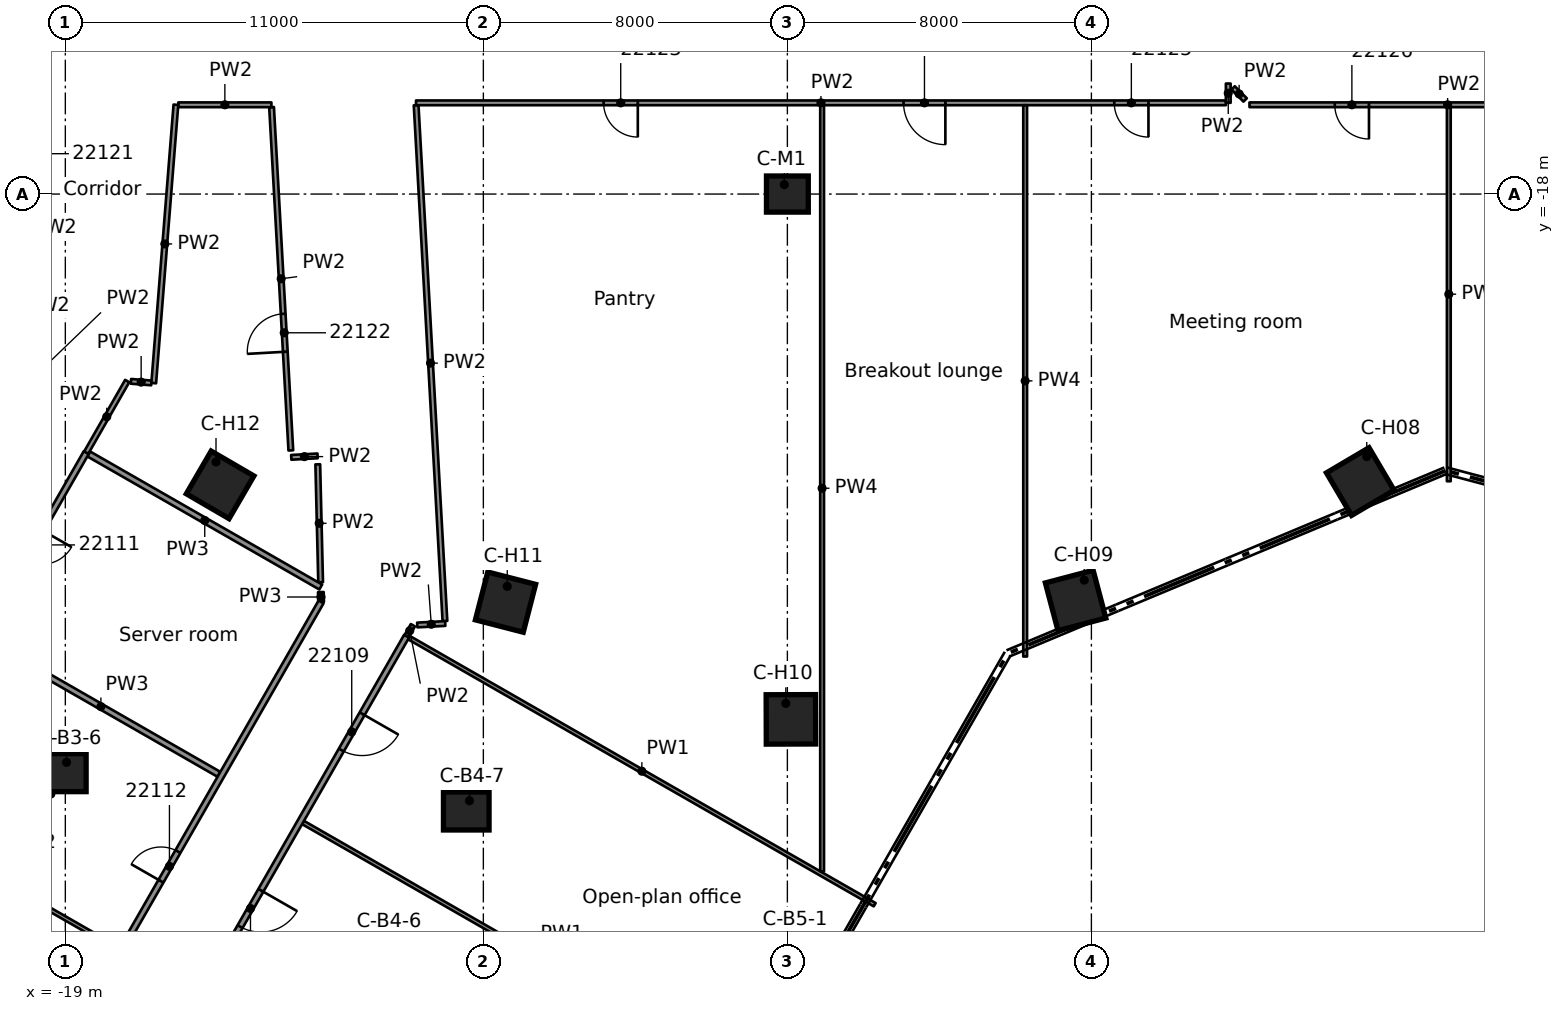
"""IFC4 building model, lengths in metres.
Left out: names, types, materials, properties, quantities, classifications, styles, units other than length and angle.
Written with IfcOpenShell. Run it as: python <this file> out.ifc"""

import sys

from ifc_helpers import new_model, si_unit, direction, frame, frame_2d, origin, origin_2d, place, context, subcontext, project, spatial, rectangle, extrude, element, fill, save


model = new_model("IFC4")
c1 = context("Model", 3, precision=1e-05, world=origin(), true_north=direction((0.0, 1.0)))
c2 = subcontext(c1, "Body", "Model", "MODEL_VIEW")
j1 = project(units=[si_unit("LENGTHUNIT", "METRE"), si_unit("PLANEANGLEUNIT", "RADIAN")], contexts=[c1])
p1 = place(None, origin())
s1 = spatial("IfcSite", under=j1, at=p1, CompositionType="ELEMENT")
p2 = place(p1, origin())
s2 = spatial("IfcBuilding", under=s1, at=p2, CompositionType="ELEMENT")
p3 = place(p2, frame((0.0, 0.0, 116.2)))
s3 = spatial("IfcBuildingStorey", under=s2, at=p3, CompositionType="ELEMENT", Elevation=116.2)
for number, where, z_axis, x_axis in (
    (1, (-19.053, -33.224, 0.0), (0.0, 0.0, 1.0), (1.0, 0.0, 0.0)),
    (2, (-8.45, -34.233, 0.0), (0.0, 0.0, 1.0), (1.0, 0.0, 0.0)),
):
    element("IfcColumn", number, at=place(p3, frame(where, z_axis=z_axis, x_axis=x_axis)), inside=s3, PredefinedType="COLUMN", context=c2, shape_type="SweptSolid", body=[
        extrude(rectangle(XDim=1.2, YDim=1.0, at=origin_2d()), origin(), (0.0, 0.0, 1.0), 3.5),
    ])
for number, where, z_axis, x_axis in (
    (3, (15.076, -25.565, 0.0), (0.0, 0.0, 1.0), (0.508, -0.861, 0.0)),
    (4, (7.584, -28.694, 0.0), (0.0, 0.0, 1.0), (0.256, -0.967, 0.0)),
    (5, (0.093, -31.822, 0.0), (0.0, 0.0, 1.0), (0.003, -1.0, 0.0)),
    (6, (-7.417, -28.737, 0.0), (0.0, 0.0, 1.0), (-0.25, -0.968, 0.0)),
    (7, (-14.927, -25.652, 0.0), (0.0, 0.0, 1.0), (-0.503, -0.864, 0.0)),
):
    element("IfcColumn", number, at=place(p3, frame(where, z_axis=z_axis, x_axis=x_axis)), inside=s3, PredefinedType="COLUMN", context=c2, shape_type="SweptSolid", body=[
        extrude(rectangle(XDim=1.3, YDim=1.3, at=origin_2d()), origin(), (0.0, 0.0, 1.0), 3.5),
    ])
p4 = place(p3, frame((0.0, -18.0, 0.0), z_axis=(0.0, 0.0, 1.0), x_axis=(1.0, 0.0, 0.0)))
e8 = element("IfcColumn", 8, at=p4, inside=s3, PredefinedType="COLUMN", context=c2, shape_type="SweptSolid", body=[
    extrude(rectangle(XDim=1.1, YDim=0.95, at=origin_2d()), origin(), (0.0, 0.0, 1.0), 3.5),
])
p5 = place(p3, frame((-12.276, -28.473, 0.0), z_axis=(0.0, 0.0, 1.0), x_axis=(0.022614384817, -0.999744262099, 0.0)))
e9 = element("IfcWall", 9, at=p5, inside=s3, PredefinedType="PARTITIONING", context=c2, shape_type="SweptSolid", body=[
    extrude(rectangle(XDim=0.259, YDim=0.15, at=frame_2d((0.129, 0.0))), origin(), (0.0, 0.0, 1.0), 3.08),
])
p6 = place(p3, frame((-12.357, -25.112, 0.0), z_axis=(0.0, 0.0, 1.0), x_axis=(0.024154763652, -0.999708231132, 0.0)))
e10 = element("IfcWall", 10, at=p6, inside=s3, PredefinedType="PARTITIONING", context=c2, shape_type="SweptSolid", body=[
    extrude(rectangle(XDim=3.103, YDim=0.125, at=frame_2d((1.552, 0.0))), origin(), (0.0, 0.0, 1.0), 3.08),
])
p7 = place(p3, frame((-13.066, -24.745, 0.0), z_axis=(0.0, 0.0, 1.0), x_axis=(-0.056052939146, 0.998427798097, 0.0)))
e11 = element("IfcWall", 11, at=p7, inside=s3, PredefinedType="PARTITIONING", context=c2, shape_type="SweptSolid", body=[
    extrude(rectangle(XDim=9.046, YDim=0.125, at=frame_2d((4.523, 0.0))), origin(), (0.0, 0.0, 1.0), 3.08),
])
p8 = place(p7, frame((2.6, 0.0, 0.0)))
e12 = element("IfcOpeningElement", 12, at=p8, cuts=e11, PredefinedType="OPENING", context=c2, shape_type="SweptSolid", body=[
    extrude(rectangle(XDim=1.0, YDim=2.1, at=frame_2d((0.5, 1.05))), frame((0.0, 0.073, 0.0), z_axis=(0.0, -1.0, 0.0), x_axis=(1.0, 0.0, 0.0)), (0.0, 0.0, 1.0), 0.145),
])
p9 = place(p3, frame((-9.769, -15.662, 0.0), z_axis=(0.0, 0.0, 1.0), x_axis=(0.055763443597, -0.998444008625, 0.0)))
e13 = element("IfcWall", 13, at=p9, inside=s3, PredefinedType="PARTITIONING", context=c2, shape_type="SweptSolid", body=[
    extrude(rectangle(XDim=13.594, YDim=0.125, at=frame_2d((6.797, 0.0))), origin(), (0.0, 0.0, 1.0), 3.08),
])
p10 = place(p3, frame((11.729, -15.207, 0.0), z_axis=(0.0, 0.0, 1.0), x_axis=(0.707106781187, -0.707106781187, 0.0)))
e14 = element("IfcWall", 14, at=p10, inside=s3, PredefinedType="PARTITIONING", context=c2, shape_type="SweptSolid", body=[
    extrude(rectangle(XDim=0.448, YDim=0.125, at=frame_2d((0.224, 0.0))), origin(), (0.0, 0.0, 1.0), 3.08),
])
p11 = place(p3, frame((-23.804, -34.304, 0.0), z_axis=(0.0, 0.0, 1.0), x_axis=(0.867490790569, -0.497453242304, 0.0)))
e15 = element("IfcWall", 15, at=p11, inside=s3, PredefinedType="PARTITIONING", context=c2, shape_type="SweptSolid", body=[
    extrude(rectangle(XDim=7.158, YDim=0.1, at=frame_2d((3.579, 0.0))), origin(), (0.0, 0.0, 1.0), 3.08),
])
p12 = place(p3, frame((-21.17, -29.705, 0.0), z_axis=(0.0, 0.0, 1.0), x_axis=(0.86744058168, -0.497540789539, 0.0)))
e16 = element("IfcWall", 16, at=p12, inside=s3, PredefinedType="PARTITIONING", context=c2, shape_type="SweptSolid", body=[
    extrude(rectangle(XDim=7.161, YDim=0.15, at=frame_2d((3.581, 0.0))), origin(), (0.0, 0.0, 1.0), 3.08),
])
p13 = place(p3, frame((-12.745, -34.536, 0.0), z_axis=(0.0, 0.0, 1.0), x_axis=(0.867470957273, -0.497487827277, 0.0)))
e17 = element("IfcWall", 17, at=p13, inside=s3, PredefinedType="PARTITIONING", context=c2, shape_type="SweptSolid", body=[
    extrude(rectangle(XDim=14.125, YDim=0.1, at=frame_2d((7.062, 0.0))), origin(), (0.0, 0.0, 1.0), 3.08),
])
p14 = place(p3, frame((-18.384, -24.839, 0.0), z_axis=(0.0, 0.0, 1.0), x_axis=(0.867482124602, -0.497468354266, 0.0)))
e18 = element("IfcWall", 18, at=p14, inside=s3, PredefinedType="PARTITIONING", context=c2, shape_type="SweptSolid", body=[
    extrude(rectangle(XDim=7.038, YDim=0.15, at=frame_2d((3.519, 0.0))), origin(), (0.0, 0.0, 1.0), 3.08),
])
p15 = place(p3, frame((-9.956, -29.673, 0.0), z_axis=(0.0, 0.0, 1.0), x_axis=(0.867525357275, -0.497392957816, 0.0)))
e19 = element("IfcWall", 19, at=p15, inside=s3, PredefinedType="PARTITIONING", context=c2, shape_type="SweptSolid", body=[
    extrude(rectangle(XDim=14.125, YDim=0.1, at=frame_2d((7.063, 0.0))), origin(), (0.0, 0.0, 1.0), 3.08),
])
p16 = place(p3, frame((-17.274, -22.928, 0.0), z_axis=(0.0, 0.0, 1.0), x_axis=(0.996965983674, -0.077838469901, 0.0)))
e20 = element("IfcWall", 20, at=p16, inside=s3, PredefinedType="PARTITIONING", context=c2, shape_type="SweptSolid", body=[
    extrude(rectangle(XDim=0.54, YDim=0.125, at=frame_2d((0.27, 0.0))), origin(), (0.0, 0.0, 1.0), 3.08),
])
p17 = place(p3, frame((-16.027, -15.651, 0.0), z_axis=(0.0, 0.0, 1.0), x_axis=(1.0, 0.0, 0.0)))
e21 = element("IfcWall", 21, at=p17, inside=s3, PredefinedType="PARTITIONING", context=c2, shape_type="SweptSolid", body=[
    extrude(rectangle(XDim=2.45, YDim=0.125, at=frame_2d((1.225, 0.0))), origin(), (0.0, 0.0, 1.0), 3.08),
])
p18 = place(p3, frame((22.587, -15.651, 0.0), z_axis=(0.0, 0.0, 1.0), x_axis=(-1.0, 0.0, 0.0)))
e22 = element("IfcWall", 22, at=p18, inside=s3, PredefinedType="PARTITIONING", context=c2, shape_type="SweptSolid", body=[
    extrude(rectangle(XDim=10.427, YDim=0.125, at=frame_2d((5.213, 0.0))), origin(), (0.0, 0.0, 1.0), 3.08),
])
p19 = place(p18, frame((7.282, 0.0, 0.0)))
e23 = element("IfcOpeningElement", 23, at=p19, cuts=e22, PredefinedType="OPENING", context=c2, shape_type="SweptSolid", body=[
    extrude(rectangle(XDim=0.9, YDim=2.1, at=frame_2d((0.45, 1.05))), frame((0.0, 0.073, 0.0), z_axis=(0.0, -1.0, 0.0), x_axis=(1.0, 0.0, 0.0)), (0.0, 0.0, 1.0), 0.145),
])
p20 = place(p3, frame((11.539, -15.6, 0.0), z_axis=(0.0, 0.0, 1.0), x_axis=(-1.0, 0.0, 0.0)))
e24 = element("IfcWall", 24, at=p20, inside=s3, PredefinedType="PARTITIONING", context=c2, shape_type="SweptSolid", body=[
    extrude(rectangle(XDim=21.311, YDim=0.125, at=frame_2d((10.656, 0.0))), origin(), (0.0, 0.0, 1.0), 3.08),
])
p21 = place(p20, frame((15.475, 0.0, 0.0)))
e25 = element("IfcOpeningElement", 25, at=p21, cuts=e24, PredefinedType="OPENING", context=c2, shape_type="SweptSolid", body=[
    extrude(rectangle(XDim=0.9, YDim=2.1, at=frame_2d((0.45, 1.05))), frame((0.0, 0.073, 0.0), z_axis=(0.0, -1.0, 0.0), x_axis=(1.0, 0.0, 0.0)), (0.0, 0.0, 1.0), 0.145),
])
p22 = place(p20, frame((7.382, 0.0, 0.0)))
e26 = element("IfcOpeningElement", 26, at=p22, cuts=e24, PredefinedType="OPENING", context=c2, shape_type="SweptSolid", body=[
    extrude(rectangle(XDim=1.1, YDim=2.1, at=frame_2d((0.55, 1.05))), frame((0.0, 0.073, 0.0), z_axis=(0.0, -1.0, 0.0), x_axis=(1.0, 0.0, 0.0)), (0.0, 0.0, 1.0), 0.145),
])
p23 = place(p20, frame((2.038, 0.0, 0.0)))
e27 = element("IfcOpeningElement", 27, at=p23, cuts=e24, PredefinedType="OPENING", context=c2, shape_type="SweptSolid", body=[
    extrude(rectangle(XDim=0.9, YDim=2.1, at=frame_2d((0.45, 1.05))), frame((0.0, 0.073, 0.0), z_axis=(0.0, -1.0, 0.0), x_axis=(1.0, 0.0, 0.0)), (0.0, 0.0, 1.0), 0.145),
])
p24 = place(p3, frame((-9.739, -29.339, 0.0), z_axis=(0.0, 0.0, 1.0), x_axis=(0.998594861221, 0.052993425471, 0.0)))
e28 = element("IfcWall", 28, at=p24, inside=s3, PredefinedType="PARTITIONING", context=c2, shape_type="SweptSolid", body=[
    extrude(rectangle(XDim=0.737, YDim=0.125, at=frame_2d((0.369, 0.0))), origin(), (0.0, 0.0, 1.0), 3.08),
])
p25 = place(p3, frame((-13.055, -24.928, 0.0), z_axis=(0.0, 0.0, 1.0), x_axis=(0.998414554179, 0.056288346959, 0.0)))
e29 = element("IfcWall", 29, at=p25, inside=s3, PredefinedType="PARTITIONING", context=c2, shape_type="SweptSolid", body=[
    extrude(rectangle(XDim=0.694, YDim=0.125, at=frame_2d((0.347, 0.0))), origin(), (0.0, 0.0, 1.0), 3.08),
])
p26 = place(p3, frame((-10.021, -29.636, 0.0), z_axis=(0.0, 0.0, 1.0), x_axis=(0.497705353429, 0.867346171473, 0.0)))
e30 = element("IfcWall", 30, at=p26, inside=s3, PredefinedType="PARTITIONING", context=c2, shape_type="SweptSolid", body=[
    extrude(rectangle(XDim=0.335, YDim=0.125, at=frame_2d((0.168, 0.0))), origin(), (0.0, 0.0, 1.0), 3.08),
])
p27 = place(p3, frame((-10.021, -29.636, 0.0), z_axis=(0.0, 0.0, 1.0), x_axis=(-0.49746005822, -0.867486882019, 0.0)))
e31 = element("IfcWall", 31, at=p27, inside=s3, PredefinedType="PARTITIONING", context=c2, shape_type="SweptSolid", body=[
    extrude(rectangle(XDim=24.806, YDim=0.15, at=frame_2d((12.403, 0.0))), origin(), (0.0, 0.0, 1.0), 3.08),
])
p28 = place(p27, frame((2.35, 0.0, 0.0)))
e32 = element("IfcOpeningElement", 32, at=p28, cuts=e31, PredefinedType="OPENING", context=c2, shape_type="SweptSolid", body=[
    extrude(rectangle(XDim=1.1, YDim=2.1, at=frame_2d((0.55, 1.05))), frame((0.0, 0.085, 0.0), z_axis=(0.0, -1.0, 0.0), x_axis=(1.0, 0.0, 0.0)), (0.0, 0.0, 1.0), 0.17),
])
p29 = place(p27, frame((7.706, 0.0, 0.0)))
e33 = element("IfcOpeningElement", 33, at=p29, cuts=e31, PredefinedType="OPENING", context=c2, shape_type="SweptSolid", body=[
    extrude(rectangle(XDim=1.1, YDim=2.1, at=frame_2d((0.55, 1.05))), frame((0.0, 0.085, 0.0), z_axis=(0.0, -1.0, 0.0), x_axis=(1.0, 0.0, 0.0)), (0.0, 0.0, 1.0), 0.17),
])
p30 = place(p27, frame((14.007, 0.0, 0.0)))
e34 = element("IfcOpeningElement", 34, at=p30, cuts=e31, PredefinedType="OPENING", context=c2, shape_type="SweptSolid", body=[
    extrude(rectangle(XDim=0.9, YDim=2.1, at=frame_2d((0.45, 1.05))), frame((0.0, 0.085, 0.0), z_axis=(0.0, -1.0, 0.0), x_axis=(1.0, 0.0, 0.0)), (0.0, 0.0, 1.0), 0.17),
])
p31 = place(p3, frame((-23.101, -47.618, 0.0), z_axis=(0.0, 0.0, 1.0), x_axis=(0.497490898243, 0.86746919609, 0.0)))
e35 = element("IfcWall", 35, at=p31, inside=s3, PredefinedType="PARTITIONING", context=c2, shape_type="SweptSolid", body=[
    extrude(rectangle(XDim=21.771, YDim=0.15, at=frame_2d((10.886, 0.0))), origin(), (0.0, 0.0, 1.0), 3.08),
])
p32 = place(p31, frame((13.3, 0.0, 0.0)))
e36 = element("IfcOpeningElement", 36, at=p32, cuts=e35, PredefinedType="OPENING", context=c2, shape_type="SweptSolid", body=[
    extrude(rectangle(XDim=0.9, YDim=2.1, at=frame_2d((0.45, 1.05))), frame((0.0, 0.085, 0.0), z_axis=(0.0, -1.0, 0.0), x_axis=(1.0, 0.0, 0.0)), (0.0, 0.0, 1.0), 0.17),
])
p33 = place(p3, frame((-18.449, -24.802, 0.0), z_axis=(0.0, 0.0, 1.0), x_axis=(-0.496915373234, -0.867799004288, 0.0)))
e37 = element("IfcWall", 37, at=p33, inside=s3, PredefinedType="PARTITIONING", context=c2, shape_type="SweptSolid", body=[
    extrude(rectangle(XDim=22.107, YDim=0.15, at=frame_2d((11.053, 0.0))), origin(), (0.0, 0.0, 1.0), 3.08),
])
p34 = place(p33, frame((2.35, 0.0, 0.0)))
e38 = element("IfcOpeningElement", 38, at=p34, cuts=e37, PredefinedType="OPENING", context=c2, shape_type="SweptSolid", body=[
    extrude(rectangle(XDim=0.9, YDim=2.1, at=frame_2d((0.45, 1.05))), frame((0.0, 0.085, 0.0), z_axis=(0.0, -1.0, 0.0), x_axis=(1.0, 0.0, 0.0)), (0.0, 0.0, 1.0), 0.17),
])
p35 = place(p33, frame((16.007, 0.0, 0.0)))
e39 = element("IfcOpeningElement", 39, at=p35, cuts=e37, PredefinedType="OPENING", context=c2, shape_type="SweptSolid", body=[
    extrude(rectangle(XDim=0.9, YDim=2.1, at=frame_2d((0.45, 1.05))), frame((0.0, 0.085, 0.0), z_axis=(0.0, -1.0, 0.0), x_axis=(1.0, 0.0, 0.0)), (0.0, 0.0, 1.0), 0.17),
])
p36 = place(p3, frame((-18.449, -24.802, 0.0), z_axis=(0.0, 0.0, 1.0), x_axis=(0.496635986683, 0.867958925717, 0.0)))
e40 = element("IfcWall", 40, at=p36, inside=s3, PredefinedType="PARTITIONING", context=c2, shape_type="SweptSolid", body=[
    extrude(rectangle(XDim=2.168, YDim=0.125, at=frame_2d((1.084, 0.0))), origin(), (0.0, 0.0, 1.0), 3.08),
])
p37 = place(p3, frame((-16.674, -22.975, 0.0), z_axis=(0.0, 0.0, 1.0), x_axis=(0.079470557758, 0.996837213616, 0.0)))
e41 = element("IfcWall", 41, at=p37, inside=s3, PredefinedType="PARTITIONING", context=c2, shape_type="SweptSolid", body=[
    extrude(rectangle(XDim=7.348, YDim=0.125, at=frame_2d((3.674, 0.0))), origin(), (0.0, 0.0, 1.0), 3.08),
])
p38 = place(p3, frame((17.405, -25.557, 0.0), z_axis=(0.0, 0.0, 1.0), x_axis=(0.0, 1.0, 0.0)))
e42 = element("IfcWall", 42, at=p38, inside=s3, PredefinedType="PARTITIONING", context=c2, shape_type="SweptSolid", body=[
    extrude(rectangle(XDim=9.844, YDim=0.1, at=frame_2d((4.922, 0.0))), origin(), (0.0, 0.0, 1.0), 3.08),
])
p39 = place(p3, frame((11.601, -15.6, 0.0), z_axis=(0.0, 0.0, 1.0), x_axis=(0.0, 1.0, 0.0)))
e43 = element("IfcWall", 43, at=p39, inside=s3, PredefinedType="PARTITIONING", context=c2, shape_type="SweptSolid", body=[
    extrude(rectangle(XDim=0.508, YDim=0.125, at=frame_2d((0.254, 0.0))), origin(), (0.0, 0.0, 1.0), 3.08),
])
p40 = place(p3, frame((6.257, -30.169, 0.0), z_axis=(0.0, 0.0, 1.0), x_axis=(0.0, 1.0, 0.0)))
e44 = element("IfcWall", 44, at=p40, inside=s3, PredefinedType="PARTITIONING", context=c2, shape_type="SweptSolid", body=[
    extrude(rectangle(XDim=14.507, YDim=0.1, at=frame_2d((7.253, 0.0))), origin(), (0.0, 0.0, 1.0), 2.445),
])
p41 = place(p3, frame((0.914, -35.82, 0.0), z_axis=(0.0, 0.0, 1.0), x_axis=(0.0, 1.0, 0.0)))
e45 = element("IfcWall", 45, at=p41, inside=s3, PredefinedType="PARTITIONING", context=c2, shape_type="SweptSolid", body=[
    extrude(rectangle(XDim=20.158, YDim=0.1, at=frame_2d((10.079, 0.0))), origin(), (0.0, 0.0, 1.0), 2.445),
])
p42 = place(p28, origin())
e46 = element("IfcDoor", 46, at=p42, inside=s3, OperationType="SINGLE_SWING_LEFT", PredefinedType="DOOR", context=c2, shape_type="SweptSolid", body=[
    extrude(rectangle(XDim=1.1, YDim=2.1, at=frame_2d((0.55, 1.05))), frame((0.0, 0.025, 0.0), z_axis=(0.0, -1.0, 0.0), x_axis=(1.0, 0.0, 0.0)), (0.0, 0.0, 1.0), 0.05),
])
fill(e32, e46)
p43 = place(p29, origin())
e47 = element("IfcDoor", 47, at=p43, inside=s3, OperationType="SINGLE_SWING_LEFT", PredefinedType="DOOR", context=c2, shape_type="SweptSolid", body=[
    extrude(rectangle(XDim=1.1, YDim=2.1, at=frame_2d((0.55, 1.05))), frame((0.0, 0.025, 0.0), z_axis=(0.0, -1.0, 0.0), x_axis=(1.0, 0.0, 0.0)), (0.0, 0.0, 1.0), 0.05),
])
fill(e33, e47)
p44 = place(p32, origin())
e48 = element("IfcDoor", 48, at=p44, inside=s3, OperationType="SINGLE_SWING_RIGHT", PredefinedType="DOOR", context=c2, shape_type="SweptSolid", body=[
    extrude(rectangle(XDim=0.9, YDim=2.1, at=frame_2d((0.45, 1.05))), frame((0.0, 0.025, 0.0), z_axis=(0.0, -1.0, 0.0), x_axis=(1.0, 0.0, 0.0)), (0.0, 0.0, 1.0), 0.05),
])
fill(e36, e48)
p45 = place(p8, origin())
e49 = element("IfcDoor", 49, at=p45, inside=s3, OperationType="SINGLE_SWING_LEFT", PredefinedType="DOOR", context=c2, shape_type="SweptSolid", body=[
    extrude(rectangle(XDim=1.0, YDim=2.1, at=frame_2d((0.5, 1.05))), frame((0.0, 0.025, 0.0), z_axis=(0.0, -1.0, 0.0), x_axis=(1.0, 0.0, 0.0)), (0.0, 0.0, 1.0), 0.05),
])
fill(e12, e49)
p46 = place(p21, origin())
e50 = element("IfcDoor", 50, at=p46, inside=s3, OperationType="SINGLE_SWING_RIGHT", PredefinedType="DOOR", context=c2, shape_type="SweptSolid", body=[
    extrude(rectangle(XDim=0.9, YDim=2.1, at=frame_2d((0.45, 1.05))), frame((0.0, 0.025, 0.0), z_axis=(0.0, -1.0, 0.0), x_axis=(1.0, 0.0, 0.0)), (0.0, 0.0, 1.0), 0.05),
])
fill(e25, e50)
p47 = place(p22, origin())
e51 = element("IfcDoor", 51, at=p47, inside=s3, OperationType="SINGLE_SWING_LEFT", PredefinedType="DOOR", context=c2, shape_type="SweptSolid", body=[
    extrude(rectangle(XDim=1.1, YDim=2.1, at=frame_2d((0.55, 1.05))), frame((0.0, 0.025, 0.0), z_axis=(0.0, -1.0, 0.0), x_axis=(1.0, 0.0, 0.0)), (0.0, 0.0, 1.0), 0.05),
])
fill(e26, e51)
p48 = place(p23, origin())
e52 = element("IfcDoor", 52, at=p48, inside=s3, OperationType="SINGLE_SWING_LEFT", PredefinedType="DOOR", context=c2, shape_type="SweptSolid", body=[
    extrude(rectangle(XDim=0.9, YDim=2.1, at=frame_2d((0.45, 1.05))), frame((0.0, 0.025, 0.0), z_axis=(0.0, -1.0, 0.0), x_axis=(1.0, 0.0, 0.0)), (0.0, 0.0, 1.0), 0.05),
])
fill(e27, e52)
p49 = place(p19, origin())
e53 = element("IfcDoor", 53, at=p49, inside=s3, OperationType="SINGLE_SWING_RIGHT", PredefinedType="DOOR", context=c2, shape_type="SweptSolid", body=[
    extrude(rectangle(XDim=0.9, YDim=2.1, at=frame_2d((0.45, 1.05))), frame((0.0, 0.025, 0.0), z_axis=(0.0, -1.0, 0.0), x_axis=(1.0, 0.0, 0.0)), (0.0, 0.0, 1.0), 0.05),
])
fill(e23, e53)
save(model, sys.argv[1])
